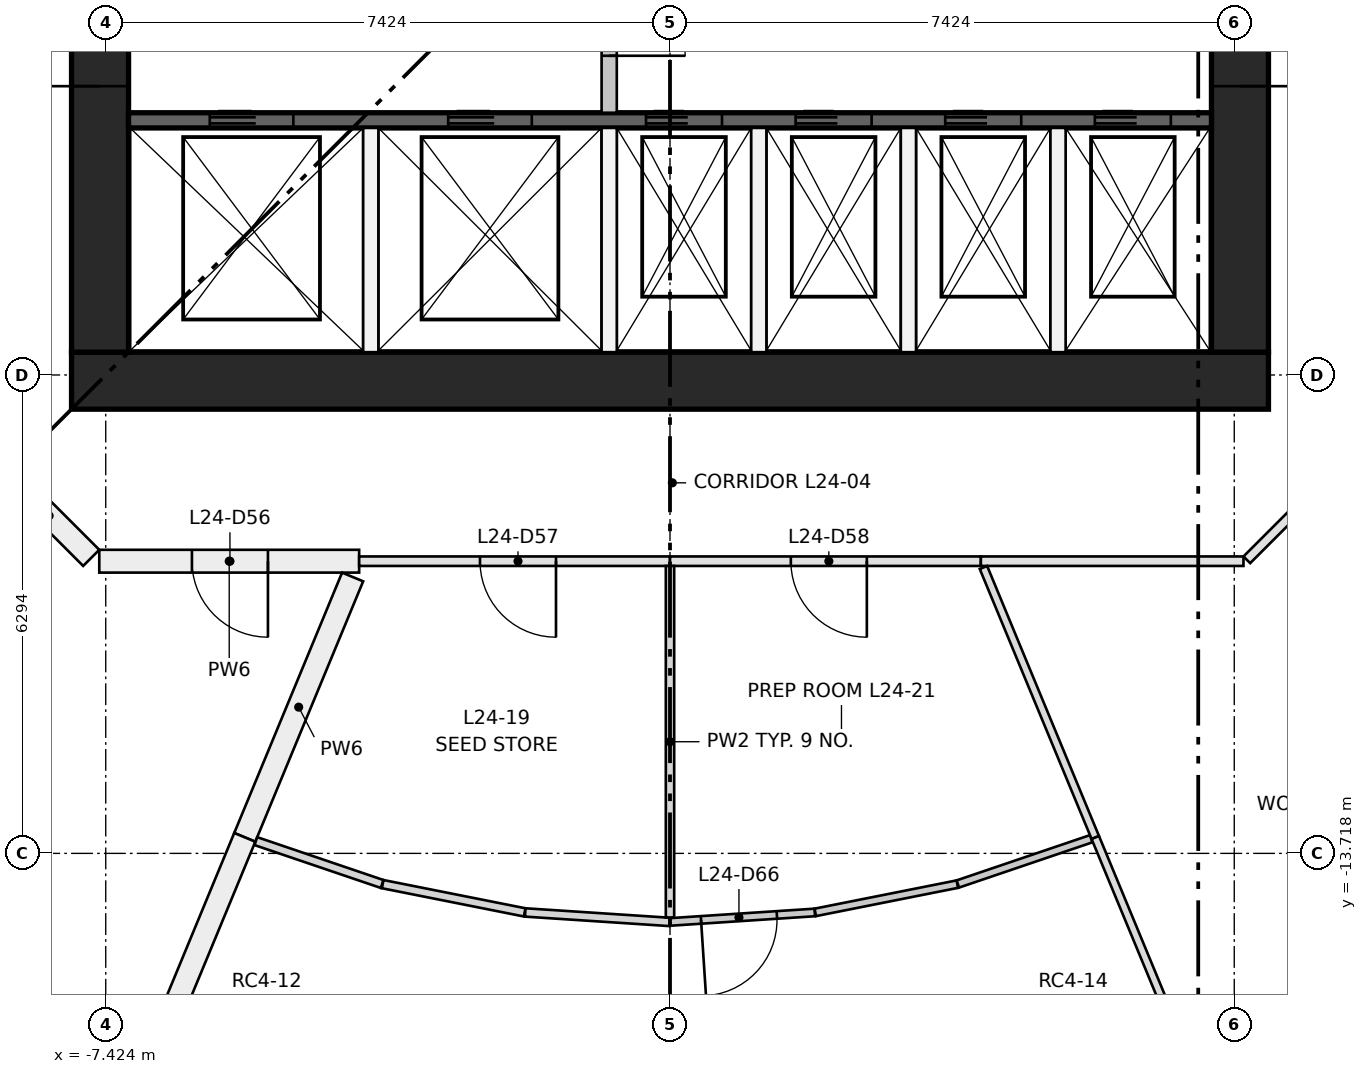
"""IFC4 building model, lengths in metres.
Left out: names, types, materials, properties, quantities, classifications, styles, units other than length and angle.
Written with IfcOpenShell. Run it as: python <this file> out.ifc"""

import sys

from ifc_helpers import new_model, si_unit, direction, frame, frame_2d, origin, place, context, subcontext, project, spatial, rectangle, extrude, element, fill, save


model = new_model("IFC4")
c1 = context("Model", 3, precision=1e-05, world=origin(), true_north=direction((0.0, 1.0)))
c2 = subcontext(c1, "Body", "Model", "MODEL_VIEW")
j1 = project(units=[si_unit("LENGTHUNIT", "METRE"), si_unit("PLANEANGLEUNIT", "RADIAN")], contexts=[c1])
p1 = place(None, origin())
s1 = spatial("IfcSite", under=j1, at=p1, CompositionType="ELEMENT")
p2 = place(p1, origin())
s2 = spatial("IfcBuilding", under=s1, at=p2, CompositionType="ELEMENT")
p3 = place(p2, frame((0.0, 0.0, 94.65)))
s3 = spatial("IfcBuildingStorey", under=s2, at=p3, CompositionType="ELEMENT", Elevation=94.65)
p4 = place(p3, frame((-7.874, -7.499, 0.0), z_axis=(0.0, 0.0, 1.0), x_axis=(1.0, 0.0, 0.0)))
e1 = element("IfcWall", 1, at=p4, inside=s3, PredefinedType="SHEAR", context=c2, shape_type="SweptSolid", body=[
    extrude(rectangle(XDim=15.748, YDim=0.75, at=frame_2d((7.874, 0.0))), origin(), (0.0, 0.0, 1.0), 3.65),
])
p5 = place(p3, frame((-7.499, -7.124, 0.0), z_axis=(0.0, 0.0, 1.0), x_axis=(0.0, 1.0, 0.0)))
e2 = element("IfcWall", 2, at=p5, inside=s3, PredefinedType="SHEAR", context=c2, shape_type="SweptSolid", body=[
    extrude(rectangle(XDim=14.248, YDim=0.75, at=frame_2d((7.124, 0.0))), origin(), (0.0, 0.0, 1.0), 3.65),
])
p6 = place(p5, frame((6.624, 0.0, 0.0)))
e3 = element("IfcOpeningElement", 3, at=p6, cuts=e2, PredefinedType="OPENING", context=c2, shape_type="SweptSolid", body=[
    extrude(rectangle(XDim=1.0, YDim=2.1, at=frame_2d((0.5, 1.05))), frame((0.0, 0.385, 0.0), z_axis=(0.0, -1.0, 0.0), x_axis=(1.0, 0.0, 0.0)), (0.0, 0.0, 1.0), 0.77),
])
p7 = place(p5, frame((3.5, 0.0, 0.0)))
e4 = element("IfcOpeningElement", 4, at=p7, cuts=e2, PredefinedType="OPENING", context=c2, shape_type="SweptSolid", body=[
    extrude(rectangle(XDim=1.8, YDim=2.1, at=frame_2d((0.9, 1.05))), frame((0.0, 0.385, 0.0), z_axis=(0.0, -1.0, 0.0), x_axis=(1.0, 0.0, 0.0)), (0.0, 0.0, 1.0), 0.77),
])
p8 = place(p5, frame((8.948, 0.0, 0.0)))
e5 = element("IfcOpeningElement", 5, at=p8, cuts=e2, PredefinedType="OPENING", context=c2, shape_type="SweptSolid", body=[
    extrude(rectangle(XDim=1.8, YDim=2.1, at=frame_2d((0.9, 1.05))), frame((0.0, 0.385, 0.0), z_axis=(0.0, -1.0, 0.0), x_axis=(1.0, 0.0, 0.0)), (0.0, 0.0, 1.0), 0.77),
])
p9 = place(p5, frame((12.124, 0.0, 0.0)))
e6 = element("IfcOpeningElement", 6, at=p9, cuts=e2, PredefinedType="OPENING", context=c2, shape_type="SweptSolid", body=[
    extrude(rectangle(XDim=1.0, YDim=2.1, at=frame_2d((0.5, 1.05))), frame((0.0, 0.385, 0.0), z_axis=(0.0, -1.0, 0.0), x_axis=(1.0, 0.0, 0.0)), (0.0, 0.0, 1.0), 0.77),
])
p10 = place(p3, frame((7.499, -7.124, 0.0), z_axis=(0.0, 0.0, 1.0), x_axis=(0.0, 1.0, 0.0)))
e7 = element("IfcWall", 7, at=p10, inside=s3, PredefinedType="SHEAR", context=c2, shape_type="SweptSolid", body=[
    extrude(rectangle(XDim=14.248, YDim=0.75, at=frame_2d((7.124, 0.0))), origin(), (0.0, 0.0, 1.0), 3.65),
])
p11 = place(p10, frame((6.624, 0.0, 0.0)))
e8 = element("IfcOpeningElement", 8, at=p11, cuts=e7, PredefinedType="OPENING", context=c2, shape_type="SweptSolid", body=[
    extrude(rectangle(XDim=1.0, YDim=2.1, at=frame_2d((0.5, 1.05))), frame((0.0, 0.385, 0.0), z_axis=(0.0, -1.0, 0.0), x_axis=(1.0, 0.0, 0.0)), (0.0, 0.0, 1.0), 0.77),
])
p12 = place(p10, frame((3.5, 0.0, 0.0)))
e9 = element("IfcOpeningElement", 9, at=p12, cuts=e7, PredefinedType="OPENING", context=c2, shape_type="SweptSolid", body=[
    extrude(rectangle(XDim=1.8, YDim=2.1, at=frame_2d((0.9, 1.05))), frame((0.0, 0.385, 0.0), z_axis=(0.0, -1.0, 0.0), x_axis=(1.0, 0.0, 0.0)), (0.0, 0.0, 1.0), 0.77),
])
p13 = place(p10, frame((8.948, 0.0, 0.0)))
e10 = element("IfcOpeningElement", 10, at=p13, cuts=e7, PredefinedType="OPENING", context=c2, shape_type="SweptSolid", body=[
    extrude(rectangle(XDim=1.8, YDim=2.1, at=frame_2d((0.9, 1.05))), frame((0.0, 0.385, 0.0), z_axis=(0.0, -1.0, 0.0), x_axis=(1.0, 0.0, 0.0)), (0.0, 0.0, 1.0), 0.77),
])
p14 = place(p3, frame((-7.124, -4.074, 0.0), z_axis=(0.0, 0.0, 1.0), x_axis=(1.0, 0.0, 0.0)))
e11 = element("IfcWall", 11, at=p14, inside=s3, PredefinedType="SHEAR", context=c2, shape_type="SweptSolid", body=[
    extrude(rectangle(XDim=14.248, YDim=0.2, at=frame_2d((7.124, 0.0))), origin(), (0.0, 0.0, 1.0), 3.3),
])
p15 = place(p14, frame((1.069, 0.0, 0.0)))
e12 = element("IfcOpeningElement", 12, at=p15, cuts=e11, PredefinedType="OPENING", context=c2, shape_type="SweptSolid", body=[
    extrude(rectangle(XDim=1.1, YDim=2.1, at=frame_2d((0.55, 1.05))), frame((0.0, 0.11, 0.0), z_axis=(0.0, -1.0, 0.0), x_axis=(1.0, 0.0, 0.0)), (0.0, 0.0, 1.0), 0.22),
])
p16 = place(p14, frame((4.206, 0.0, 0.0)))
e13 = element("IfcOpeningElement", 13, at=p16, cuts=e11, PredefinedType="OPENING", context=c2, shape_type="SweptSolid", body=[
    extrude(rectangle(XDim=1.1, YDim=2.1, at=frame_2d((0.55, 1.05))), frame((0.0, 0.11, 0.0), z_axis=(0.0, -1.0, 0.0), x_axis=(1.0, 0.0, 0.0)), (0.0, 0.0, 1.0), 0.22),
])
p17 = place(p14, frame((6.808, 0.0, 0.0)))
e14 = element("IfcOpeningElement", 14, at=p17, cuts=e11, PredefinedType="OPENING", context=c2, shape_type="SweptSolid", body=[
    extrude(rectangle(XDim=1.0, YDim=2.1, at=frame_2d((0.5, 1.05))), frame((0.0, 0.11, 0.0), z_axis=(0.0, -1.0, 0.0), x_axis=(1.0, 0.0, 0.0)), (0.0, 0.0, 1.0), 0.22),
])
p18 = place(p14, frame((8.777, 0.0, 0.0)))
e15 = element("IfcOpeningElement", 15, at=p18, cuts=e11, PredefinedType="OPENING", context=c2, shape_type="SweptSolid", body=[
    extrude(rectangle(XDim=1.0, YDim=2.1, at=frame_2d((0.5, 1.05))), frame((0.0, 0.11, 0.0), z_axis=(0.0, -1.0, 0.0), x_axis=(1.0, 0.0, 0.0)), (0.0, 0.0, 1.0), 0.22),
])
p19 = place(p14, frame((10.745, 0.0, 0.0)))
e16 = element("IfcOpeningElement", 16, at=p19, cuts=e11, PredefinedType="OPENING", context=c2, shape_type="SweptSolid", body=[
    extrude(rectangle(XDim=1.0, YDim=2.1, at=frame_2d((0.5, 1.05))), frame((0.0, 0.11, 0.0), z_axis=(0.0, -1.0, 0.0), x_axis=(1.0, 0.0, 0.0)), (0.0, 0.0, 1.0), 0.22),
])
p20 = place(p14, frame((12.714, 0.0, 0.0)))
e17 = element("IfcOpeningElement", 17, at=p20, cuts=e11, PredefinedType="OPENING", context=c2, shape_type="SweptSolid", body=[
    extrude(rectangle(XDim=1.0, YDim=2.1, at=frame_2d((0.5, 1.05))), frame((0.0, 0.11, 0.0), z_axis=(0.0, -1.0, 0.0), x_axis=(1.0, 0.0, 0.0)), (0.0, 0.0, 1.0), 0.22),
])
for number, where, z_axis, x_axis in (
    (18, (-3.937, -7.124, 0.0), (0.0, 0.0, 1.0), (0.0, 1.0, 0.0)),
    (19, (-0.8, -7.124, 0.0), (0.0, 0.0, 1.0), (0.0, 1.0, 0.0)),
):
    element("IfcWall", number, at=place(p3, frame(where, z_axis=z_axis, x_axis=x_axis)), inside=s3, PredefinedType="PARTITIONING", context=c2, shape_type="SweptSolid", body=[
        extrude(rectangle(XDim=2.95, YDim=0.2, at=frame_2d((1.475, 0.0))), origin(), (0.0, 0.0, 1.0), 3.3),
    ])
p21 = place(p3, frame((-0.8, -3.974, 0.0), z_axis=(0.0, 0.0, 1.0), x_axis=(0.0, 1.0, 0.0)))
e20 = element("IfcWall", 20, at=p21, inside=s3, PredefinedType="PARTITIONING", context=c2, shape_type="SweptSolid", body=[
    extrude(rectangle(XDim=2.499, YDim=0.2, at=frame_2d((1.25, 0.0))), origin(), (0.0, 0.0, 1.0), 3.3),
])
p22 = place(p21, frame((0.75, 0.0, 0.0)))
e21 = element("IfcOpeningElement", 21, at=p22, cuts=e20, PredefinedType="OPENING", context=c2, shape_type="SweptSolid", body=[
    extrude(rectangle(XDim=1.0, YDim=2.1, at=frame_2d((0.5, 1.05))), frame((0.0, 0.11, 0.0), z_axis=(0.0, -1.0, 0.0), x_axis=(1.0, 0.0, 0.0)), (0.0, 0.0, 1.0), 0.22),
])
for number, where, z_axis, x_axis in (
    (22, (1.168, -7.124, 0.0), (0.0, 0.0, 1.0), (0.0, 1.0, 0.0)),
    (23, (3.137, -7.124, 0.0), (0.0, 0.0, 1.0), (0.0, 1.0, 0.0)),
    (24, (5.105, -7.124, 0.0), (0.0, 0.0, 1.0), (0.0, 1.0, 0.0)),
):
    element("IfcWall", number, at=place(p3, frame(where, z_axis=z_axis, x_axis=x_axis)), inside=s3, PredefinedType="PARTITIONING", context=c2, shape_type="SweptSolid", body=[
        extrude(rectangle(XDim=2.95, YDim=0.2, at=frame_2d((1.475, 0.0))), origin(), (0.0, 0.0, 1.0), 3.3),
    ])
p23 = place(p3, frame((-7.615, -9.83, 0.0), z_axis=(0.0, 0.0, 1.0), x_axis=(-0.707028841614, 0.70718471217, 0.0)))
e25 = element("IfcWall", 25, at=p23, inside=s3, PredefinedType="PARTITIONING", context=c2, shape_type="SweptSolid", body=[
    extrude(rectangle(XDim=1.566, YDim=0.3, at=frame_2d((0.783, 0.0))), origin(), (0.0, 0.0, 1.0), 3.3),
])
p24 = place(p3, frame((-4.09, -9.874, 0.0), z_axis=(0.0, 0.0, 1.0), x_axis=(-1.0, 0.0, 0.0)))
e26 = element("IfcWall", 26, at=p24, inside=s3, PredefinedType="PARTITIONING", context=c2, shape_type="SweptSolid", body=[
    extrude(rectangle(XDim=3.419, YDim=0.3, at=frame_2d((1.709, 0.0))), origin(), (0.0, 0.0, 1.0), 3.3),
])
p25 = place(p24, frame((1.2, 0.0, 0.0)))
e27 = element("IfcOpeningElement", 27, at=p25, cuts=e26, PredefinedType="OPENING", context=c2, shape_type="SweptSolid", body=[
    extrude(rectangle(XDim=1.0, YDim=2.1, at=frame_2d((0.5, 1.05))), frame((0.0, 0.16, 0.0), z_axis=(0.0, -1.0, 0.0), x_axis=(1.0, 0.0, 0.0)), (0.0, 0.0, 1.0), 0.32),
])
p26 = place(p3, frame((0.0, -9.874, 0.0), z_axis=(0.0, 0.0, 1.0), x_axis=(-1.0, 0.0, 0.0)))
e28 = element("IfcWall", 28, at=p26, inside=s3, PredefinedType="PARTITIONING", context=c2, shape_type="SweptSolid", body=[
    extrude(rectangle(XDim=4.09, YDim=0.125, at=frame_2d((2.045, 0.0))), origin(), (0.0, 0.0, 1.0), 3.3),
])
p27 = place(p26, frame((1.5, 0.0, 0.0)))
e29 = element("IfcOpeningElement", 29, at=p27, cuts=e28, PredefinedType="OPENING", context=c2, shape_type="SweptSolid", body=[
    extrude(rectangle(XDim=1.0, YDim=2.1, at=frame_2d((0.5, 1.05))), frame((0.0, 0.073, 0.0), z_axis=(0.0, -1.0, 0.0), x_axis=(1.0, 0.0, 0.0)), (0.0, 0.0, 1.0), 0.145),
])
p28 = place(p3, frame((4.09, -9.874, 0.0), z_axis=(0.0, 0.0, 1.0), x_axis=(-1.0, 0.0, 0.0)))
e30 = element("IfcWall", 30, at=p28, inside=s3, PredefinedType="PARTITIONING", context=c2, shape_type="SweptSolid", body=[
    extrude(rectangle(XDim=4.09, YDim=0.125, at=frame_2d((2.045, 0.0))), origin(), (0.0, 0.0, 1.0), 3.3),
])
p29 = place(p28, frame((1.5, 0.0, 0.0)))
e31 = element("IfcOpeningElement", 31, at=p29, cuts=e30, PredefinedType="OPENING", context=c2, shape_type="SweptSolid", body=[
    extrude(rectangle(XDim=1.0, YDim=2.1, at=frame_2d((0.5, 1.05))), frame((0.0, 0.073, 0.0), z_axis=(0.0, -1.0, 0.0), x_axis=(1.0, 0.0, 0.0)), (0.0, 0.0, 1.0), 0.145),
])
p30 = place(p3, frame((7.545, -9.874, 0.0), z_axis=(0.0, 0.0, 1.0), x_axis=(-1.0, 0.0, 0.0)))
e32 = element("IfcWall", 32, at=p30, inside=s3, PredefinedType="PARTITIONING", context=c2, shape_type="SweptSolid", body=[
    extrude(rectangle(XDim=3.455, YDim=0.125, at=frame_2d((1.728, 0.0))), origin(), (0.0, 0.0, 1.0), 3.3),
])
p31 = place(p3, frame((8.722, -8.722, 0.0), z_axis=(0.0, 0.0, 1.0), x_axis=(-0.707030604857, -0.70718294931, 0.0)))
e33 = element("IfcWall", 33, at=p31, inside=s3, PredefinedType="PARTITIONING", context=c2, shape_type="SweptSolid", body=[
    extrude(rectangle(XDim=1.603, YDim=0.125, at=frame_2d((0.801, 0.0))), origin(), (0.0, 0.0, 1.0), 3.3),
])
p32 = place(p3, frame((-4.176, -10.081, 0.0), z_axis=(0.0, 0.0, 1.0), x_axis=(-0.382669680004, -0.923885228806, 0.0)))
e34 = element("IfcWall", 34, at=p32, inside=s3, PredefinedType="PARTITIONING", context=c2, shape_type="SweptSolid", body=[
    extrude(rectangle(XDim=3.708, YDim=0.3, at=frame_2d((1.854, 0.0))), origin(), (0.0, 0.0, 1.0), 3.3),
])
p33 = place(p3, frame((-5.595, -13.507, 0.0), z_axis=(0.0, 0.0, 1.0), x_axis=(-0.382681133009, -0.923880484932, 0.0)))
e35 = element("IfcWall", 35, at=p33, inside=s3, PredefinedType="PARTITIONING", context=c2, shape_type="SweptSolid", body=[
    extrude(rectangle(XDim=3.47, YDim=0.3, at=frame_2d((1.735, 0.0))), origin(), (0.0, 0.0, 1.0), 3.3),
])
p34 = place(p3, frame((-3.787, -14.121, 0.0), z_axis=(0.0, 0.0, 1.0), x_axis=(-0.946943921292, 0.321398833116, 0.0)))
e36 = element("IfcWall", 36, at=p34, inside=s3, PredefinedType="PARTITIONING", context=c2, shape_type="SweptSolid", body=[
    extrude(rectangle(XDim=1.755, YDim=0.11, at=frame_2d((0.877, 0.0))), origin(), (0.0, 0.0, 1.0), 3.3),
])
p35 = place(p3, frame((-1.912, -14.494, 0.0), z_axis=(0.0, 0.0, 1.0), x_axis=(-0.980796931486, 0.195031738924, 0.0)))
e37 = element("IfcWall", 37, at=p35, inside=s3, PredefinedType="PARTITIONING", context=c2, shape_type="SweptSolid", body=[
    extrude(rectangle(XDim=1.905, YDim=0.11, at=frame_2d((0.953, 0.0))), origin(), (0.0, 0.0, 1.0), 3.3),
])
p36 = place(p3, frame((0.0, -14.62, 0.0), z_axis=(0.0, 0.0, 1.0), x_axis=(-0.997853662235, 0.065483347227, 0.0)))
e38 = element("IfcWall", 38, at=p36, inside=s3, PredefinedType="PARTITIONING", context=c2, shape_type="SweptSolid", body=[
    extrude(rectangle(XDim=1.909, YDim=0.11, at=frame_2d((0.955, 0.0))), origin(), (0.0, 0.0, 1.0), 3.3),
])
p37 = place(p3, frame((0.0, -9.937, 0.0), z_axis=(0.0, 0.0, 1.0), x_axis=(0.0, -1.0, 0.0)))
e39 = element("IfcWall", 39, at=p37, inside=s3, PredefinedType="PARTITIONING", context=c2, shape_type="SweptSolid", body=[
    extrude(rectangle(XDim=4.625, YDim=0.11, at=frame_2d((2.312, 0.0))), origin(), (0.0, 0.0, 1.0), 3.3),
])
p38 = place(p3, frame((1.905, -14.495, 0.0), z_axis=(0.0, 0.0, 1.0), x_axis=(-0.997854210562, -0.065474991133, 0.0)))
e40 = element("IfcWall", 40, at=p38, inside=s3, PredefinedType="PARTITIONING", context=c2, shape_type="SweptSolid", body=[
    extrude(rectangle(XDim=1.909, YDim=0.1, at=frame_2d((0.955, 0.0))), origin(), (0.0, 0.0, 1.0), 3.3),
])
p39 = place(p38, frame((0.5, 0.0, 0.0)))
e41 = element("IfcOpeningElement", 41, at=p39, cuts=e40, PredefinedType="OPENING", context=c2, shape_type="SweptSolid", body=[
    extrude(rectangle(XDim=1.0, YDim=2.1, at=frame_2d((0.5, 1.05))), frame((0.0, 0.06, 0.0), z_axis=(0.0, -1.0, 0.0), x_axis=(1.0, 0.0, 0.0)), (0.0, 0.0, 1.0), 0.12),
])
p40 = place(p3, frame((1.912, -14.494, 0.0), z_axis=(0.0, 0.0, 1.0), x_axis=(0.980757648215, 0.195229187027, 0.0)))
e42 = element("IfcWall", 42, at=p40, inside=s3, PredefinedType="PARTITIONING", context=c2, shape_type="SweptSolid", body=[
    extrude(rectangle(XDim=1.906, YDim=0.1, at=frame_2d((0.953, 0.0))), origin(), (0.0, 0.0, 1.0), 3.3),
])
p41 = place(p3, frame((3.787, -14.121, 0.0), z_axis=(0.0, 0.0, 1.0), x_axis=(0.946970110486, 0.321321661029, 0.0)))
e43 = element("IfcWall", 43, at=p41, inside=s3, PredefinedType="PARTITIONING", context=c2, shape_type="SweptSolid", body=[
    extrude(rectangle(XDim=1.853, YDim=0.1, at=frame_2d((0.927, 0.0))), origin(), (0.0, 0.0, 1.0), 3.3),
])
p42 = place(p3, frame((5.595, -13.507, 0.0), z_axis=(0.0, 0.0, 1.0), x_axis=(0.382681133009, -0.923880484932, 0.0)))
e44 = element("IfcWall", 44, at=p42, inside=s3, PredefinedType="PARTITIONING", context=c2, shape_type="SweptSolid", body=[
    extrude(rectangle(XDim=3.47, YDim=0.105, at=frame_2d((1.735, 0.0))), origin(), (0.0, 0.0, 1.0), 3.3),
])
p43 = place(p3, frame((4.124, -9.957, 0.0), z_axis=(0.0, 0.0, 1.0), x_axis=(0.382688429768, -0.923877462503, 0.0)))
e45 = element("IfcWall", 45, at=p43, inside=s3, PredefinedType="PARTITIONING", context=c2, shape_type="SweptSolid", body=[
    extrude(rectangle(XDim=3.843, YDim=0.105, at=frame_2d((1.921, 0.0))), origin(), (0.0, 0.0, 1.0), 3.3),
])
p44 = place(p15, origin())
e46 = element("IfcDoor", 46, at=p44, inside=s3, OperationType="DOUBLE_DOOR_SLIDING", PredefinedType="DOOR", context=c2, shape_type="SweptSolid", body=[
    extrude(rectangle(XDim=1.1, YDim=2.1, at=frame_2d((0.55, 1.05))), frame((0.0, 0.025, 0.0), z_axis=(0.0, -1.0, 0.0), x_axis=(1.0, 0.0, 0.0)), (0.0, 0.0, 1.0), 0.05),
])
fill(e12, e46)
p45 = place(p16, origin())
e47 = element("IfcDoor", 47, at=p45, inside=s3, OperationType="DOUBLE_DOOR_SLIDING", PredefinedType="DOOR", context=c2, shape_type="SweptSolid", body=[
    extrude(rectangle(XDim=1.1, YDim=2.1, at=frame_2d((0.55, 1.05))), frame((0.0, 0.025, 0.0), z_axis=(0.0, -1.0, 0.0), x_axis=(1.0, 0.0, 0.0)), (0.0, 0.0, 1.0), 0.05),
])
fill(e13, e47)
p46 = place(p17, origin())
e48 = element("IfcDoor", 48, at=p46, inside=s3, OperationType="DOUBLE_DOOR_SLIDING", PredefinedType="DOOR", context=c2, shape_type="SweptSolid", body=[
    extrude(rectangle(XDim=1.0, YDim=2.1, at=frame_2d((0.5, 1.05))), frame((0.0, 0.025, 0.0), z_axis=(0.0, -1.0, 0.0), x_axis=(1.0, 0.0, 0.0)), (0.0, 0.0, 1.0), 0.05),
])
fill(e14, e48)
p47 = place(p18, origin())
e49 = element("IfcDoor", 49, at=p47, inside=s3, OperationType="DOUBLE_DOOR_SLIDING", PredefinedType="DOOR", context=c2, shape_type="SweptSolid", body=[
    extrude(rectangle(XDim=1.0, YDim=2.1, at=frame_2d((0.5, 1.05))), frame((0.0, 0.025, 0.0), z_axis=(0.0, -1.0, 0.0), x_axis=(1.0, 0.0, 0.0)), (0.0, 0.0, 1.0), 0.05),
])
fill(e15, e49)
p48 = place(p19, origin())
e50 = element("IfcDoor", 50, at=p48, inside=s3, OperationType="DOUBLE_DOOR_SLIDING", PredefinedType="DOOR", context=c2, shape_type="SweptSolid", body=[
    extrude(rectangle(XDim=1.0, YDim=2.1, at=frame_2d((0.5, 1.05))), frame((0.0, 0.025, 0.0), z_axis=(0.0, -1.0, 0.0), x_axis=(1.0, 0.0, 0.0)), (0.0, 0.0, 1.0), 0.05),
])
fill(e16, e50)
p49 = place(p20, origin())
e51 = element("IfcDoor", 51, at=p49, inside=s3, OperationType="DOUBLE_DOOR_SLIDING", PredefinedType="DOOR", context=c2, shape_type="SweptSolid", body=[
    extrude(rectangle(XDim=1.0, YDim=2.1, at=frame_2d((0.5, 1.05))), frame((0.0, 0.025, 0.0), z_axis=(0.0, -1.0, 0.0), x_axis=(1.0, 0.0, 0.0)), (0.0, 0.0, 1.0), 0.05),
])
fill(e17, e51)
p50 = place(p22, frame((1.0, 0.0, 0.0), z_axis=(0.0, 0.0, 1.0), x_axis=(-1.0, 0.0, 0.0)))
e52 = element("IfcDoor", 52, at=p50, inside=s3, OperationType="SINGLE_SWING_LEFT", PredefinedType="DOOR", context=c2, shape_type="SweptSolid", body=[
    extrude(rectangle(XDim=1.0, YDim=2.1, at=frame_2d((0.5, 1.05))), frame((0.0, 0.025, 0.0), z_axis=(0.0, -1.0, 0.0), x_axis=(1.0, 0.0, 0.0)), (0.0, 0.0, 1.0), 0.05),
])
fill(e21, e52)
p51 = place(p7, origin())
e53 = element("IfcDoor", 53, at=p51, inside=s3, OperationType="DOUBLE_DOOR_SINGLE_SWING", PredefinedType="DOOR", context=c2, shape_type="SweptSolid", body=[
    extrude(rectangle(XDim=1.8, YDim=2.1, at=frame_2d((0.9, 1.05))), frame((0.0, 0.025, 0.0), z_axis=(0.0, -1.0, 0.0), x_axis=(1.0, 0.0, 0.0)), (0.0, 0.0, 1.0), 0.05),
])
fill(e4, e53)
p52 = place(p12, frame((1.8, 0.0, 0.0), z_axis=(0.0, 0.0, 1.0), x_axis=(-1.0, 0.0, 0.0)))
e54 = element("IfcDoor", 54, at=p52, inside=s3, OperationType="DOUBLE_DOOR_SINGLE_SWING", PredefinedType="DOOR", context=c2, shape_type="SweptSolid", body=[
    extrude(rectangle(XDim=1.8, YDim=2.1, at=frame_2d((0.9, 1.05))), frame((0.0, 0.025, 0.0), z_axis=(0.0, -1.0, 0.0), x_axis=(1.0, 0.0, 0.0)), (0.0, 0.0, 1.0), 0.05),
])
fill(e9, e54)
p53 = place(p25, origin())
e55 = element("IfcDoor", 55, at=p53, inside=s3, OperationType="SINGLE_SWING_LEFT", PredefinedType="DOOR", context=c2, shape_type="SweptSolid", body=[
    extrude(rectangle(XDim=1.0, YDim=2.1, at=frame_2d((0.5, 1.05))), frame((0.0, 0.025, 0.0), z_axis=(0.0, -1.0, 0.0), x_axis=(1.0, 0.0, 0.0)), (0.0, 0.0, 1.0), 0.05),
])
fill(e27, e55)
p54 = place(p27, origin())
e56 = element("IfcDoor", 56, at=p54, inside=s3, OperationType="SINGLE_SWING_LEFT", PredefinedType="DOOR", context=c2, shape_type="SweptSolid", body=[
    extrude(rectangle(XDim=1.0, YDim=2.1, at=frame_2d((0.5, 1.05))), frame((0.0, 0.025, 0.0), z_axis=(0.0, -1.0, 0.0), x_axis=(1.0, 0.0, 0.0)), (0.0, 0.0, 1.0), 0.05),
])
fill(e29, e56)
p55 = place(p29, origin())
e57 = element("IfcDoor", 57, at=p55, inside=s3, OperationType="SINGLE_SWING_LEFT", PredefinedType="DOOR", context=c2, shape_type="SweptSolid", body=[
    extrude(rectangle(XDim=1.0, YDim=2.1, at=frame_2d((0.5, 1.05))), frame((0.0, 0.025, 0.0), z_axis=(0.0, -1.0, 0.0), x_axis=(1.0, 0.0, 0.0)), (0.0, 0.0, 1.0), 0.05),
])
fill(e31, e57)
p56 = place(p39, origin())
e58 = element("IfcDoor", 58, at=p56, inside=s3, OperationType="SINGLE_SWING_RIGHT", PredefinedType="DOOR", context=c2, shape_type="SweptSolid", body=[
    extrude(rectangle(XDim=1.0, YDim=2.1, at=frame_2d((0.5, 1.05))), frame((0.0, 0.025, 0.0), z_axis=(0.0, -1.0, 0.0), x_axis=(1.0, 0.0, 0.0)), (0.0, 0.0, 1.0), 0.05),
])
fill(e41, e58)
save(model, sys.argv[1])
